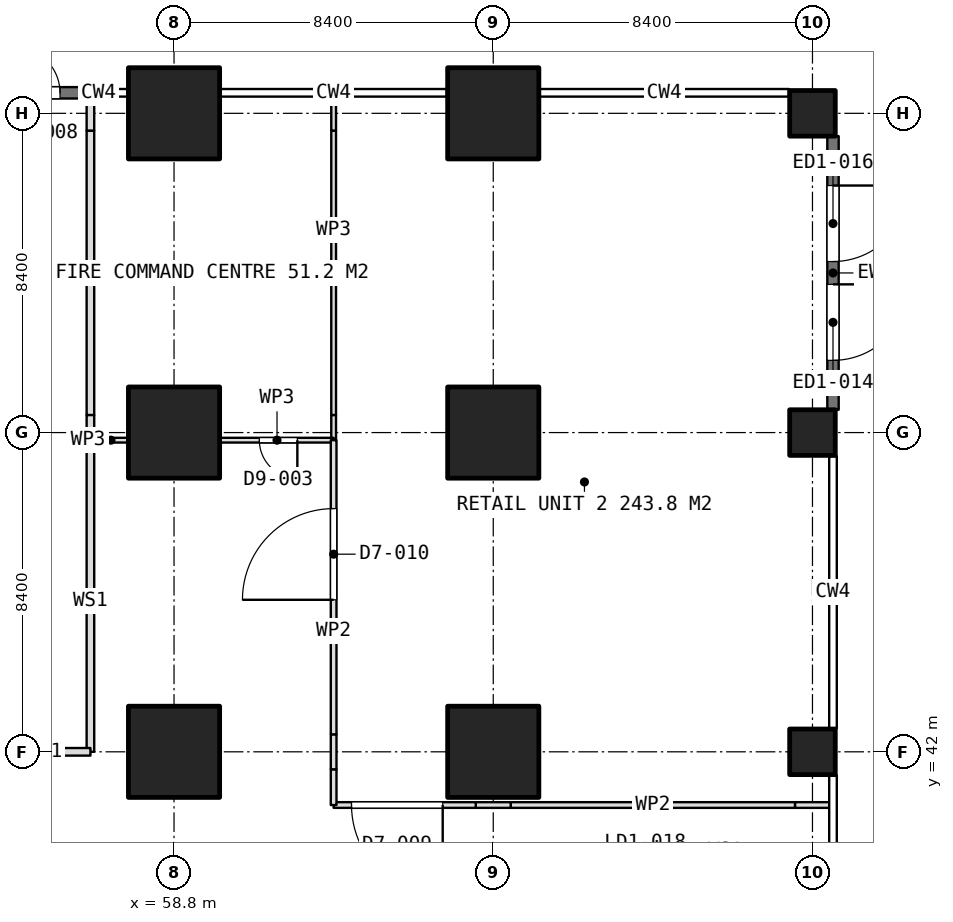
"""IFC4 building model, lengths in metres.
Left out: names, types, materials, properties, quantities, classifications, styles, units other than length and angle.
Written with IfcOpenShell. Run it as: python <this file> out.ifc"""

import sys

from ifc_helpers import new_model, si_unit, direction, frame, frame_2d, origin, origin_2d, place, context, subcontext, project, spatial, rectangle, extrude, element, fill, save


model = new_model("IFC4")
c1 = context("Model", 3, precision=1e-05, world=origin(), true_north=direction((0.0, 1.0)))
c2 = subcontext(c1, "Body", "Model", "MODEL_VIEW")
j1 = project(units=[si_unit("LENGTHUNIT", "METRE"), si_unit("PLANEANGLEUNIT", "RADIAN")], contexts=[c1])
p1 = place(None, origin())
s1 = spatial("IfcSite", under=j1, at=p1, CompositionType="ELEMENT")
p2 = place(p1, origin())
s2 = spatial("IfcBuilding", under=s1, at=p2, CompositionType="ELEMENT")
p3 = place(p2, origin())
s3 = spatial("IfcBuildingStorey", under=s2, at=p3, CompositionType="ELEMENT", Elevation=0.0)
for number, where, z_axis, x_axis in (
    (1, (58.8, 42.0, 0.0), (0.0, 0.0, 1.0), (1.0, 0.0, 0.0)),
    (2, (58.8, 50.4, 0.0), (0.0, 0.0, 1.0), (1.0, 0.0, 0.0)),
    (3, (58.8, 58.8, 0.0), (0.0, 0.0, 1.0), (1.0, 0.0, 0.0)),
    (4, (67.2, 42.0, 0.0), (0.0, 0.0, 1.0), (1.0, 0.0, 0.0)),
    (5, (67.2, 50.4, 0.0), (0.0, 0.0, 1.0), (1.0, 0.0, 0.0)),
    (6, (67.2, 58.8, 0.0), (0.0, 0.0, 1.0), (1.0, 0.0, 0.0)),
):
    element("IfcColumn", number, at=place(p3, frame(where, z_axis=z_axis, x_axis=x_axis)), inside=s3, PredefinedType="COLUMN", context=c2, shape_type="SweptSolid", body=[
        extrude(rectangle(XDim=2.4, YDim=2.4, at=origin_2d()), origin(), (0.0, 0.0, 1.0), 5.4),
    ])
for number, where, z_axis, x_axis in (
    (7, (75.6, 42.0, 0.0), (0.0, 0.0, 1.0), (1.0, 0.0, 0.0)),
    (8, (75.6, 50.4, 0.0), (0.0, 0.0, 1.0), (1.0, 0.0, 0.0)),
    (9, (75.6, 58.8, 0.0), (0.0, 0.0, 1.0), (1.0, 0.0, 0.0)),
):
    element("IfcColumn", number, at=place(p3, frame(where, z_axis=z_axis, x_axis=x_axis)), inside=s3, PredefinedType="COLUMN", context=c2, shape_type="SweptSolid", body=[
        extrude(rectangle(XDim=1.2, YDim=1.2, at=origin_2d()), origin(), (0.0, 0.0, 1.0), 5.4),
    ])
p4 = place(p3, frame((76.14, 58.199, 0.0), z_axis=(0.0, 0.0, 1.0), x_axis=(0.0, -1.0, 0.0)))
e10 = element("IfcWall", 10, at=p4, inside=s3, PredefinedType="SOLIDWALL", context=c2, shape_type="SweptSolid", body=[
    extrude(rectangle(XDim=7.198, YDim=0.3, at=frame_2d((3.599, 0.0))), origin(), (0.0, 0.0, 1.0), 3.3),
])
p5 = place(p4, frame((3.899, 0.0, 0.0)))
e11 = element("IfcOpeningElement", 11, at=p5, cuts=e10, PredefinedType="OPENING", context=c2, shape_type="SweptSolid", body=[
    extrude(rectangle(XDim=2.0, YDim=2.7, at=frame_2d((1.0, 1.35))), frame((0.0, 0.16, 0.0), z_axis=(0.0, -1.0, 0.0), x_axis=(1.0, 0.0, 0.0)), (0.0, 0.0, 1.0), 0.32),
])
p6 = place(p4, frame((1.299, 0.0, 0.0)))
e12 = element("IfcOpeningElement", 12, at=p6, cuts=e10, PredefinedType="OPENING", context=c2, shape_type="SweptSolid", body=[
    extrude(rectangle(XDim=2.0, YDim=2.7, at=frame_2d((1.0, 1.35))), frame((0.0, 0.16, 0.0), z_axis=(0.0, -1.0, 0.0), x_axis=(1.0, 0.0, 0.0)), (0.0, 0.0, 1.0), 0.32),
])
p7 = place(p3, frame((51.601, 59.34, 0.0), z_axis=(0.0, 0.0, 1.0), x_axis=(1.0, 0.0, 0.0)))
e13 = element("IfcWall", 13, at=p7, inside=s3, PredefinedType="SOLIDWALL", context=c2, shape_type="SweptSolid", body=[
    extrude(rectangle(XDim=4.799, YDim=0.3, at=frame_2d((2.399, 0.0))), origin(), (0.0, 0.0, 1.0), 3.3),
])
p8 = place(p7, frame((2.999, 0.0, 0.0)))
e14 = element("IfcOpeningElement", 14, at=p8, cuts=e13, PredefinedType="OPENING", context=c2, shape_type="SweptSolid", body=[
    extrude(rectangle(XDim=1.2, YDim=2.4, at=frame_2d((0.6, 1.2))), frame((0.0, 0.16, 0.0), z_axis=(0.0, -1.0, 0.0), x_axis=(1.0, 0.0, 0.0)), (0.0, 0.0, 1.0), 0.32),
])
p9 = place(p7, frame((1.199, 0.0, 0.0)))
e15 = element("IfcOpeningElement", 15, at=p9, cuts=e13, PredefinedType="OPENING", context=c2, shape_type="SweptSolid", body=[
    extrude(rectangle(XDim=1.2, YDim=2.4, at=frame_2d((0.6, 1.2))), frame((0.0, 0.16, 0.0), z_axis=(0.0, -1.0, 0.0), x_axis=(1.0, 0.0, 0.0)), (0.0, 0.0, 1.0), 0.32),
])
p10 = place(p3, frame((56.6, 59.29, 0.0), z_axis=(0.0, 0.0, 1.0), x_axis=(0.0, -1.0, 0.0)))
e16 = element("IfcWall", 16, at=p10, inside=s3, PredefinedType="PARTITIONING", context=c2, shape_type="SweptSolid", body=[
    extrude(rectangle(XDim=0.95, YDim=0.2, at=frame_2d((0.475, 0.0))), origin(), (0.0, 0.0, 1.0), 3.3),
])
p11 = place(p3, frame((56.6, 58.34, 0.0), z_axis=(0.0, 0.0, 1.0), x_axis=(0.0, -1.0, 0.0)))
e17 = element("IfcWall", 17, at=p11, inside=s3, PredefinedType="PARTITIONING", context=c2, shape_type="SweptSolid", body=[
    extrude(rectangle(XDim=7.48, YDim=0.2, at=frame_2d((3.74, 0.0))), origin(), (0.0, 0.0, 1.0), 5.1),
])
p12 = place(p3, frame((56.6, 50.86, 0.0), z_axis=(0.0, 0.0, 1.0), x_axis=(0.0, -1.0, 0.0)))
e18 = element("IfcWall", 18, at=p12, inside=s3, PredefinedType="PARTITIONING", context=c2, shape_type="SweptSolid", body=[
    extrude(rectangle(XDim=0.92, YDim=0.2, at=frame_2d((0.46, 0.0))), origin(), (0.0, 0.0, 1.0), 3.3),
])
p13 = place(p3, frame((56.6, 49.94, 0.0), z_axis=(0.0, 0.0, 1.0), x_axis=(0.0, -1.0, 0.0)))
e19 = element("IfcWall", 19, at=p13, inside=s3, PredefinedType="PARTITIONING", context=c2, shape_type="SweptSolid", body=[
    extrude(rectangle(XDim=7.94, YDim=0.2, at=frame_2d((3.97, 0.0))), origin(), (0.0, 0.0, 1.0), 5.1),
])
p14 = place(p3, frame((56.6, 42.0, 0.0), z_axis=(0.0, 0.0, 1.0), x_axis=(-1.0, 0.0, 0.0)))
e20 = element("IfcWall", 20, at=p14, inside=s3, PredefinedType="PARTITIONING", context=c2, shape_type="SweptSolid", body=[
    extrude(rectangle(XDim=2.4, YDim=0.2, at=frame_2d((1.2, 0.0))), origin(), (0.0, 0.0, 1.0), 5.1),
])
p15 = place(p3, frame((63.0, 59.29, 0.0), z_axis=(0.0, 0.0, 1.0), x_axis=(0.0, -1.0, 0.0)))
e21 = element("IfcWall", 21, at=p15, inside=s3, PredefinedType="PARTITIONING", context=c2, shape_type="SweptSolid", body=[
    extrude(rectangle(XDim=0.95, YDim=0.125, at=frame_2d((0.475, 0.0))), origin(), (0.0, 0.0, 1.0), 3.3),
])
p16 = place(p3, frame((63.0, 58.34, 0.0), z_axis=(0.0, 0.0, 1.0), x_axis=(0.0, -1.0, 0.0)))
e22 = element("IfcWall", 22, at=p16, inside=s3, PredefinedType="PARTITIONING", context=c2, shape_type="SweptSolid", body=[
    extrude(rectangle(XDim=7.48, YDim=0.125, at=frame_2d((3.74, 0.0))), origin(), (0.0, 0.0, 1.0), 5.1),
])
p17 = place(p3, frame((63.0, 50.86, 0.0), z_axis=(0.0, 0.0, 1.0), x_axis=(0.0, -1.0, 0.0)))
e23 = element("IfcWall", 23, at=p17, inside=s3, PredefinedType="PARTITIONING", context=c2, shape_type="SweptSolid", body=[
    extrude(rectangle(XDim=0.66, YDim=0.125, at=frame_2d((0.33, 0.0))), origin(), (0.0, 0.0, 1.0), 3.3),
])
p18 = place(p3, frame((63.0, 50.2, 0.0), z_axis=(0.0, 0.0, 1.0), x_axis=(-1.0, 0.0, 0.0)))
e24 = element("IfcWall", 24, at=p18, inside=s3, PredefinedType="PARTITIONING", context=c2, shape_type="SweptSolid", body=[
    extrude(rectangle(XDim=2.98, YDim=0.125, at=frame_2d((1.49, 0.0))), origin(), (0.0, 0.0, 1.0), 3.3),
])
p19 = place(p18, frame((0.955, 0.0, 0.0)))
e25 = element("IfcOpeningElement", 25, at=p19, cuts=e24, PredefinedType="OPENING", context=c2, shape_type="SweptSolid", body=[
    extrude(rectangle(XDim=1.0, YDim=2.1, at=frame_2d((0.5, 1.05))), frame((0.0, 0.073, 0.0), z_axis=(0.0, -1.0, 0.0), x_axis=(1.0, 0.0, 0.0)), (0.0, 0.0, 1.0), 0.145),
])
p20 = place(p3, frame((57.58, 50.2, 0.0), z_axis=(0.0, 0.0, 1.0), x_axis=(-1.0, 0.0, 0.0)))
e26 = element("IfcWall", 26, at=p20, inside=s3, PredefinedType="PARTITIONING", context=c2, shape_type="SweptSolid", body=[
    extrude(rectangle(XDim=0.88, YDim=0.125, at=frame_2d((0.44, 0.0))), origin(), (0.0, 0.0, 1.0), 3.3),
])
p21 = place(p3, frame((76.09, 40.6, 0.0), z_axis=(0.0, 0.0, 1.0), x_axis=(-1.0, 0.0, 0.0)))
e27 = element("IfcWall", 27, at=p21, inside=s3, PredefinedType="PARTITIONING", context=c2, shape_type="SweptSolid", body=[
    extrude(rectangle(XDim=0.95, YDim=0.15, at=frame_2d((0.475, 0.0))), origin(), (0.0, 0.0, 1.0), 3.3),
])
p22 = place(p3, frame((75.14, 40.6, 0.0), z_axis=(0.0, 0.0, 1.0), x_axis=(-1.0, 0.0, 0.0)))
e28 = element("IfcWall", 28, at=p22, inside=s3, PredefinedType="PARTITIONING", context=c2, shape_type="SweptSolid", body=[
    extrude(rectangle(XDim=7.48, YDim=0.15, at=frame_2d((3.74, 0.0))), origin(), (0.0, 0.0, 1.0), 5.1),
])
p23 = place(p3, frame((67.66, 40.6, 0.0), z_axis=(0.0, 0.0, 1.0), x_axis=(-1.0, 0.0, 0.0)))
e29 = element("IfcWall", 29, at=p23, inside=s3, PredefinedType="PARTITIONING", context=c2, shape_type="SweptSolid", body=[
    extrude(rectangle(XDim=0.92, YDim=0.15, at=frame_2d((0.46, 0.0))), origin(), (0.0, 0.0, 1.0), 3.3),
])
p24 = place(p3, frame((66.74, 40.6, 0.0), z_axis=(0.0, 0.0, 1.0), x_axis=(-1.0, 0.0, 0.0)))
e30 = element("IfcWall", 30, at=p24, inside=s3, PredefinedType="PARTITIONING", context=c2, shape_type="SweptSolid", body=[
    extrude(rectangle(XDim=3.74, YDim=0.15, at=frame_2d((1.87, 0.0))), origin(), (0.0, 0.0, 1.0), 5.1),
])
p25 = place(p24, frame((0.87, 0.0, 0.0)))
e31 = element("IfcOpeningElement", 31, at=p25, cuts=e30, PredefinedType="OPENING", context=c2, shape_type="SweptSolid", body=[
    extrude(rectangle(XDim=2.4, YDim=2.4, at=frame_2d((1.2, 1.2))), frame((0.0, 0.085, 0.0), z_axis=(0.0, -1.0, 0.0), x_axis=(1.0, 0.0, 0.0)), (0.0, 0.0, 1.0), 0.17),
])
p26 = place(p3, frame((63.0, 40.6, 0.0), z_axis=(0.0, 0.0, 1.0), x_axis=(0.0, 1.0, 0.0)))
e32 = element("IfcWall", 32, at=p26, inside=s3, PredefinedType="PARTITIONING", context=c2, shape_type="SweptSolid", body=[
    extrude(rectangle(XDim=0.94, YDim=0.15, at=frame_2d((0.47, 0.0))), origin(), (0.0, 0.0, 1.0), 5.1),
])
p27 = place(p3, frame((63.0, 41.54, 0.0), z_axis=(0.0, 0.0, 1.0), x_axis=(0.0, 1.0, 0.0)))
e33 = element("IfcWall", 33, at=p27, inside=s3, PredefinedType="PARTITIONING", context=c2, shape_type="SweptSolid", body=[
    extrude(rectangle(XDim=0.92, YDim=0.15, at=frame_2d((0.46, 0.0))), origin(), (0.0, 0.0, 1.0), 3.3),
])
p28 = place(p3, frame((63.0, 42.46, 0.0), z_axis=(0.0, 0.0, 1.0), x_axis=(0.0, 1.0, 0.0)))
e34 = element("IfcWall", 34, at=p28, inside=s3, PredefinedType="PARTITIONING", context=c2, shape_type="SweptSolid", body=[
    extrude(rectangle(XDim=7.74, YDim=0.15, at=frame_2d((3.87, 0.0))), origin(), (0.0, 0.0, 1.0), 3.3),
])
p29 = place(p28, frame((3.54, 0.0, 0.0)))
e35 = element("IfcOpeningElement", 35, at=p29, cuts=e34, PredefinedType="OPENING", context=c2, shape_type="SweptSolid", body=[
    extrude(rectangle(XDim=2.4, YDim=2.4, at=frame_2d((1.2, 1.2))), frame((0.0, 0.085, 0.0), z_axis=(0.0, -1.0, 0.0), x_axis=(1.0, 0.0, 0.0)), (0.0, 0.0, 1.0), 0.17),
])
p30 = place(p5, origin())
e36 = element("IfcDoor", 36, at=p30, inside=s3, OperationType="DOUBLE_DOOR_SINGLE_SWING", PredefinedType="DOOR", context=c2, shape_type="SweptSolid", body=[
    extrude(rectangle(XDim=2.0, YDim=2.7, at=frame_2d((1.0, 1.35))), frame((0.0, 0.025, 0.0), z_axis=(0.0, -1.0, 0.0), x_axis=(1.0, 0.0, 0.0)), (0.0, 0.0, 1.0), 0.05),
])
fill(e11, e36)
p31 = place(p6, origin())
e37 = element("IfcDoor", 37, at=p31, inside=s3, OperationType="DOUBLE_DOOR_SINGLE_SWING", PredefinedType="DOOR", context=c2, shape_type="SweptSolid", body=[
    extrude(rectangle(XDim=2.0, YDim=2.7, at=frame_2d((1.0, 1.35))), frame((0.0, 0.025, 0.0), z_axis=(0.0, -1.0, 0.0), x_axis=(1.0, 0.0, 0.0)), (0.0, 0.0, 1.0), 0.05),
])
fill(e12, e37)
p32 = place(p8, origin())
e38 = element("IfcDoor", 38, at=p32, inside=s3, OperationType="SINGLE_SWING_LEFT", PredefinedType="DOOR", context=c2, shape_type="SweptSolid", body=[
    extrude(rectangle(XDim=1.2, YDim=2.4, at=frame_2d((0.6, 1.2))), frame((0.0, 0.025, 0.0), z_axis=(0.0, -1.0, 0.0), x_axis=(1.0, 0.0, 0.0)), (0.0, 0.0, 1.0), 0.05),
])
fill(e14, e38)
p33 = place(p19, origin())
e39 = element("IfcDoor", 39, at=p33, inside=s3, OperationType="SINGLE_SWING_LEFT", PredefinedType="DOOR", context=c2, shape_type="SweptSolid", body=[
    extrude(rectangle(XDim=1.0, YDim=2.1, at=frame_2d((0.5, 1.05))), frame((0.0, 0.025, 0.0), z_axis=(0.0, -1.0, 0.0), x_axis=(1.0, 0.0, 0.0)), (0.0, 0.0, 1.0), 0.05),
])
fill(e25, e39)
p34 = place(p29, origin())
e40 = element("IfcDoor", 40, at=p34, inside=s3, OperationType="DOUBLE_DOOR_SINGLE_SWING", PredefinedType="DOOR", context=c2, shape_type="SweptSolid", body=[
    extrude(rectangle(XDim=2.4, YDim=2.4, at=frame_2d((1.2, 1.2))), frame((0.0, 0.025, 0.0), z_axis=(0.0, -1.0, 0.0), x_axis=(1.0, 0.0, 0.0)), (0.0, 0.0, 1.0), 0.05),
])
fill(e35, e40)
p35 = place(p25, origin())
e41 = element("IfcDoor", 41, at=p35, inside=s3, OperationType="DOUBLE_DOOR_SINGLE_SWING", PredefinedType="DOOR", context=c2, shape_type="SweptSolid", body=[
    extrude(rectangle(XDim=2.4, YDim=2.4, at=frame_2d((1.2, 1.2))), frame((0.0, 0.025, 0.0), z_axis=(0.0, -1.0, 0.0), x_axis=(1.0, 0.0, 0.0)), (0.0, 0.0, 1.0), 0.05),
])
fill(e31, e41)
save(model, sys.argv[1])
